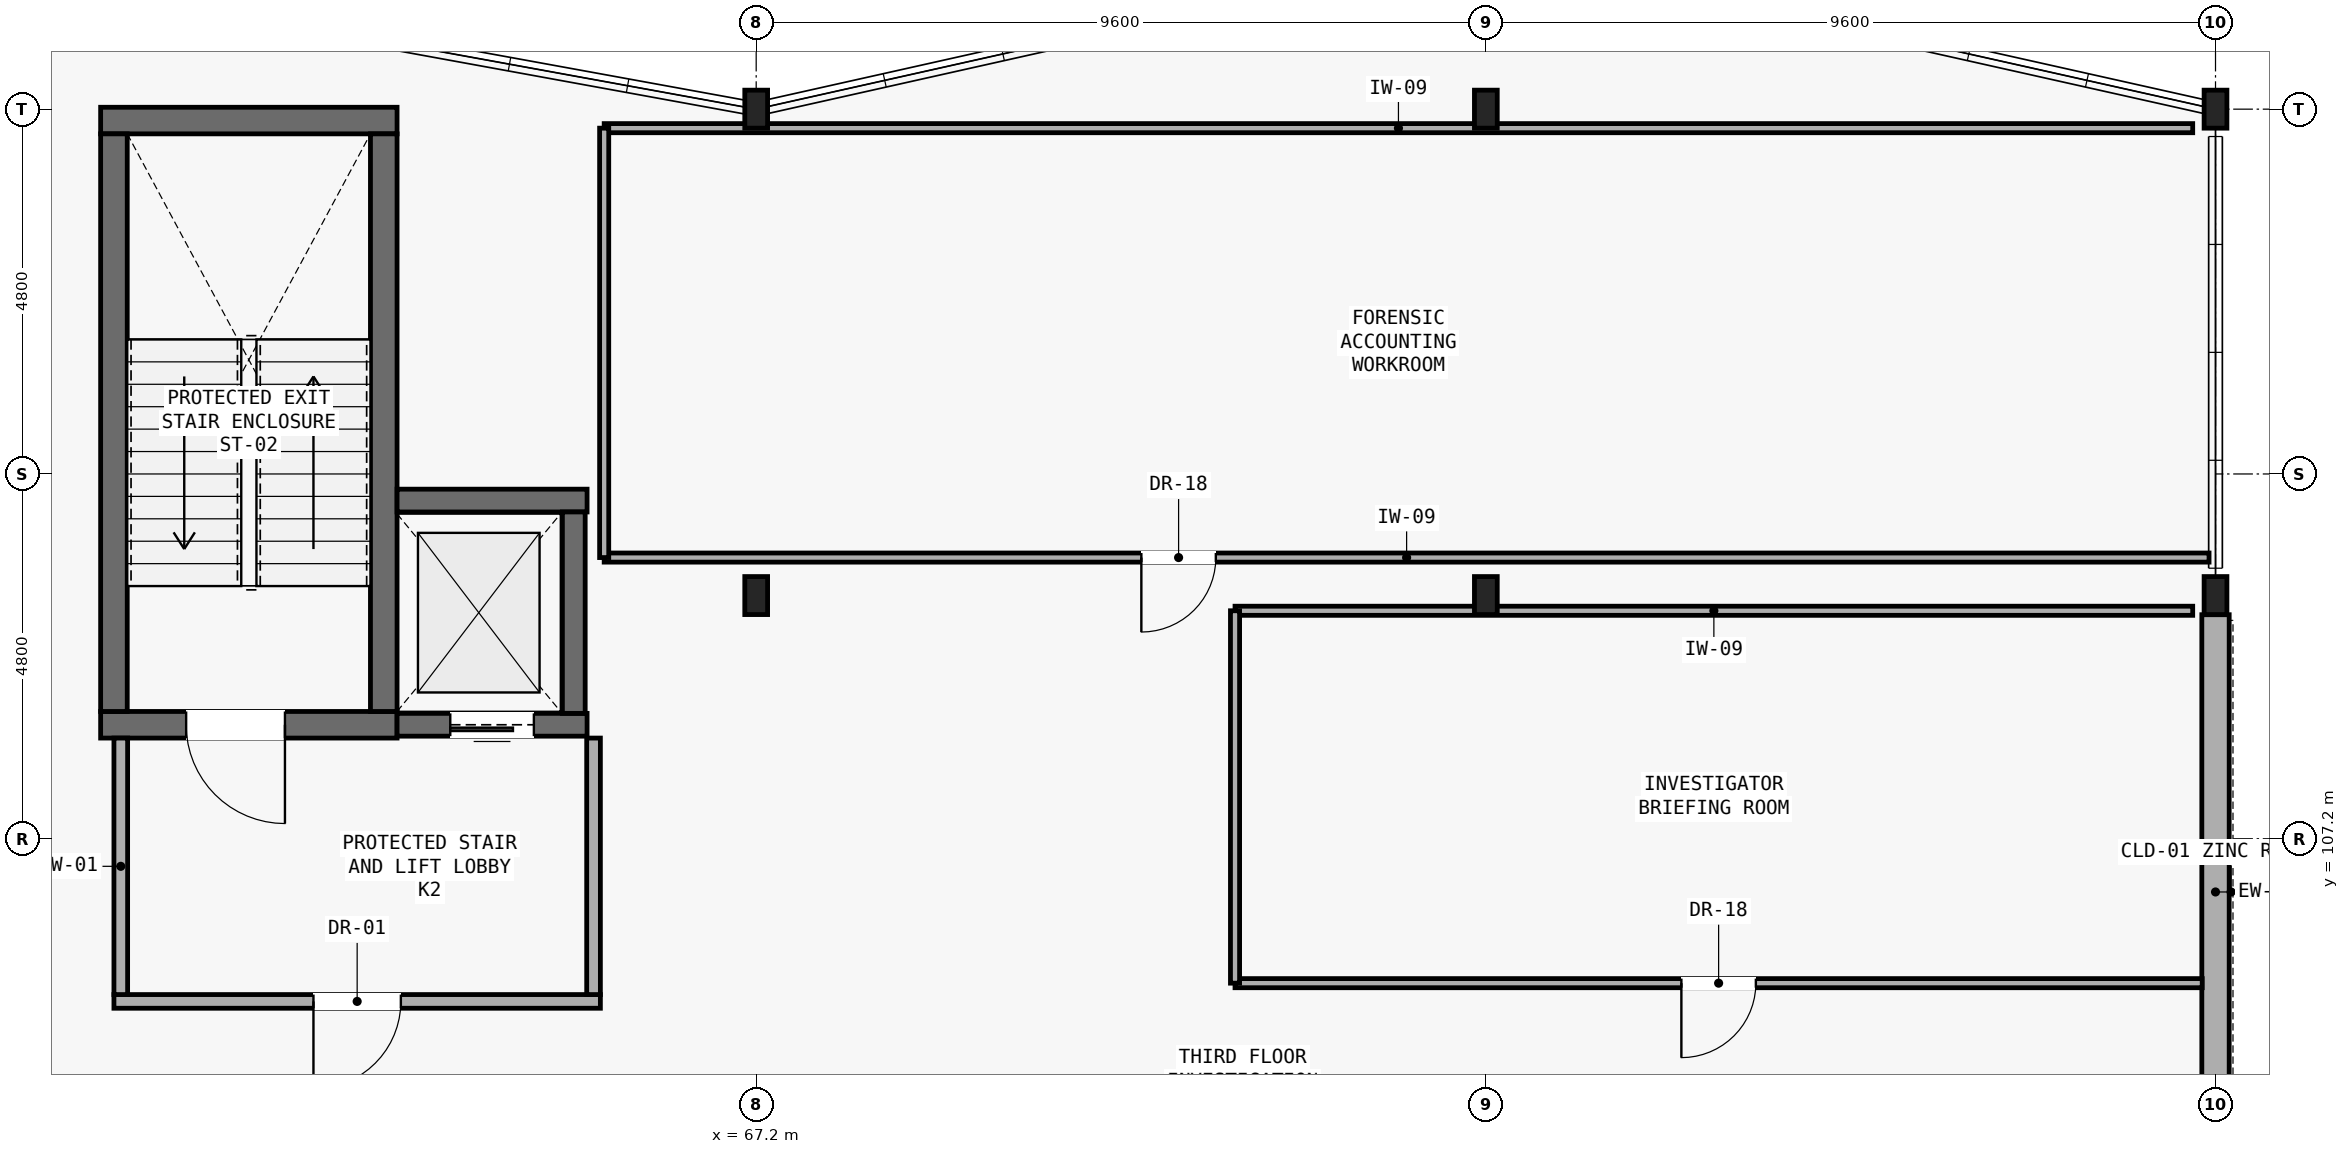
"""IFC4 building model, lengths in metres.
Left out: names, types, materials, properties, quantities, classifications, styles, units other than length and angle.
Written with IfcOpenShell. Run it as: python <this file> out.ifc"""

import sys

from ifc_helpers import new_model, si_unit, direction, frame, frame_2d, origin, origin_2d, place, context, subcontext, project, spatial, rectangle, i_section, extrude, element, fill, save


model = new_model("IFC4")
c1 = context("Model", 3, precision=1e-05, world=origin(), true_north=direction((0.0, 1.0)))
c2 = subcontext(c1, "Body", "Model", "MODEL_VIEW")
j1 = project(units=[si_unit("LENGTHUNIT", "METRE"), si_unit("PLANEANGLEUNIT", "RADIAN")], contexts=[c1])
p1 = place(None, origin())
s1 = spatial("IfcSite", under=j1, at=p1, CompositionType="ELEMENT")
p2 = place(p1, origin())
s2 = spatial("IfcBuilding", under=s1, at=p2, CompositionType="ELEMENT")
p3 = place(p2, frame((0.0, 0.0, 13.65)))
s3 = spatial("IfcBuildingStorey", under=s2, at=p3, CompositionType="ELEMENT", Elevation=13.65)
for number, where, z_axis, x_axis in (
    (1, (67.2, 110.4, 0.0), (0.0, 0.0, 1.0), (1.0, 0.0, 0.0)),
    (2, (67.2, 116.8, 0.0), (0.0, 0.0, 1.0), (1.0, 0.0, 0.0)),
    (3, (76.8, 110.4, 0.0), (0.0, 0.0, 1.0), (1.0, 0.0, 0.0)),
    (4, (76.8, 116.8, 0.0), (0.0, 0.0, 1.0), (1.0, 0.0, 0.0)),
    (5, (86.4, 110.4, 0.0), (0.0, 0.0, 1.0), (1.0, 0.0, 0.0)),
    (6, (86.4, 116.8, 0.0), (0.0, 0.0, 1.0), (1.0, 0.0, 0.0)),
):
    element("IfcColumn", number, at=place(p3, frame(where, z_axis=z_axis, x_axis=x_axis)), inside=s3, PredefinedType="COLUMN", context=c2, shape_type="SweptSolid", body=[
        extrude(i_section(OverallWidth=0.3, OverallDepth=0.5, WebThickness=0.014, FlangeThickness=0.028, FilletRadius=0.027, at=origin_2d()), origin(), (0.0, 0.0, 1.0), 4.2),
    ])
p4 = place(p3, frame((86.4, 102.852, 0.0), z_axis=(0.0, 0.0, 1.0), x_axis=(0.0, 1.0, 0.0)))
e7 = element("IfcWall", 7, at=p4, inside=s3, PredefinedType="SOLIDWALL", context=c2, shape_type="SweptSolid", body=[
    extrude(rectangle(XDim=7.296, YDim=0.36, at=frame_2d((3.648, 0.0))), origin(), (0.0, 0.0, 1.0), 3.52),
])
p5 = place(p3, frame((58.575, 108.7, 0.0), z_axis=(0.0, 0.0, 1.0), x_axis=(1.0, 0.0, 0.0)))
e8 = element("IfcWall", 8, at=p5, inside=s3, PredefinedType="SHEAR", context=c2, shape_type="SweptSolid", body=[
    extrude(rectangle(XDim=3.9, YDim=0.35, at=frame_2d((1.95, 0.0))), origin(), (0.0, 0.0, 1.0), 3.98),
])
p6 = place(p5, frame((1.125, 0.0, 0.0)))
e9 = element("IfcOpeningElement", 9, at=p6, cuts=e8, PredefinedType="OPENING", context=c2, shape_type="SweptSolid", body=[
    extrude(rectangle(XDim=1.3, YDim=2.15, at=frame_2d((0.65, 1.075))), frame((0.0, 0.185, 0.0), z_axis=(0.0, -1.0, 0.0), x_axis=(1.0, 0.0, 0.0)), (0.0, 0.0, 1.0), 0.37),
])
p7 = place(p3, frame((58.575, 116.65, 0.0), z_axis=(0.0, 0.0, 1.0), x_axis=(1.0, 0.0, 0.0)))
e10 = element("IfcWall", 10, at=p7, inside=s3, PredefinedType="SHEAR", context=c2, shape_type="SweptSolid", body=[
    extrude(rectangle(XDim=3.9, YDim=0.35, at=frame_2d((1.95, 0.0))), origin(), (0.0, 0.0, 1.0), 3.98),
])
for number, where, z_axis, x_axis in (
    (11, (58.75, 108.875, 0.0), (0.0, 0.0, 1.0), (0.0, 1.0, 0.0)),
    (12, (62.3, 108.875, 0.0), (0.0, 0.0, 1.0), (0.0, 1.0, 0.0)),
):
    element("IfcWall", number, at=place(p3, frame(where, z_axis=z_axis, x_axis=x_axis)), inside=s3, PredefinedType="SHEAR", context=c2, shape_type="SweptSolid", body=[
        extrude(rectangle(XDim=7.6, YDim=0.35, at=frame_2d((3.8, 0.0))), origin(), (0.0, 0.0, 1.0), 3.98),
    ])
p8 = place(p3, frame((62.475, 108.7, 0.0), z_axis=(0.0, 0.0, 1.0), x_axis=(1.0, 0.0, 0.0)))
e13 = element("IfcWall", 13, at=p8, inside=s3, PredefinedType="SHEAR", context=c2, shape_type="SweptSolid", body=[
    extrude(rectangle(XDim=2.5, YDim=0.3, at=frame_2d((1.25, 0.0))), origin(), (0.0, 0.0, 1.0), 3.98),
])
p9 = place(p8, frame((0.7, 0.0, 0.0)))
e14 = element("IfcOpeningElement", 14, at=p9, cuts=e13, PredefinedType="OPENING", context=c2, shape_type="SweptSolid", body=[
    extrude(rectangle(XDim=1.1, YDim=2.1, at=frame_2d((0.55, 1.05))), frame((0.0, 0.16, 0.0), z_axis=(0.0, -1.0, 0.0), x_axis=(1.0, 0.0, 0.0)), (0.0, 0.0, 1.0), 0.32),
])
p10 = place(p3, frame((62.475, 111.65, 0.0), z_axis=(0.0, 0.0, 1.0), x_axis=(1.0, 0.0, 0.0)))
e15 = element("IfcWall", 15, at=p10, inside=s3, PredefinedType="SHEAR", context=c2, shape_type="SweptSolid", body=[
    extrude(rectangle(XDim=2.5, YDim=0.3, at=frame_2d((1.25, 0.0))), origin(), (0.0, 0.0, 1.0), 3.98),
])
p11 = place(p3, frame((64.8, 108.85, 0.0), z_axis=(0.0, 0.0, 1.0), x_axis=(0.0, 1.0, 0.0)))
e16 = element("IfcWall", 16, at=p11, inside=s3, PredefinedType="SHEAR", context=c2, shape_type="SweptSolid", body=[
    extrude(rectangle(XDim=2.65, YDim=0.3, at=frame_2d((1.325, 0.0))), origin(), (0.0, 0.0, 1.0), 3.98),
])
p12 = place(p3, frame((58.75, 105.06, 0.0), z_axis=(0.0, 0.0, 1.0), x_axis=(1.0, 0.0, 0.0)))
e17 = element("IfcWall", 17, at=p12, inside=s3, PredefinedType="PARTITIONING", context=c2, shape_type="SweptSolid", body=[
    extrude(rectangle(XDim=6.4, YDim=0.18, at=frame_2d((3.2, 0.0))), origin(), (0.0, 0.0, 1.0), 3.6),
])
p13 = place(p12, frame((2.625, 0.0, 0.0)))
e18 = element("IfcOpeningElement", 18, at=p13, cuts=e17, PredefinedType="OPENING", context=c2, shape_type="SweptSolid", body=[
    extrude(rectangle(XDim=1.15, YDim=2.15, at=frame_2d((0.575, 1.075))), frame((0.0, 0.1, 0.0), z_axis=(0.0, -1.0, 0.0), x_axis=(1.0, 0.0, 0.0)), (0.0, 0.0, 1.0), 0.2),
])
for number, where, z_axis, x_axis in (
    (19, (58.84, 105.15, 0.0), (0.0, 0.0, 1.0), (0.0, 1.0, 0.0)),
    (20, (65.06, 105.15, 0.0), (0.0, 0.0, 1.0), (0.0, 1.0, 0.0)),
):
    element("IfcWall", number, at=place(p3, frame(where, z_axis=z_axis, x_axis=x_axis)), inside=s3, PredefinedType="PARTITIONING", context=c2, shape_type="SweptSolid", body=[
        extrude(rectangle(XDim=3.375, YDim=0.18, at=frame_2d((1.688, 0.0))), origin(), (0.0, 0.0, 1.0), 3.98),
    ])
p14 = place(p3, frame((65.2, 110.9, 0.0), z_axis=(0.0, 0.0, 1.0), x_axis=(1.0, 0.0, 0.0)))
e21 = element("IfcWall", 21, at=p14, inside=s3, PredefinedType="PARTITIONING", context=c2, shape_type="SweptSolid", body=[
    extrude(rectangle(XDim=21.115, YDim=0.12, at=frame_2d((10.558, 0.0))), origin(), (0.0, 0.0, 1.0), 3.98),
])
p15 = place(p14, frame((7.067, 0.0, 0.0)))
e22 = element("IfcOpeningElement", 22, at=p15, cuts=e21, PredefinedType="OPENING", context=c2, shape_type="SweptSolid", body=[
    extrude(rectangle(XDim=0.98, YDim=2.1, at=frame_2d((0.49, 1.05))), frame((0.0, 0.07, 0.0), z_axis=(0.0, -1.0, 0.0), x_axis=(1.0, 0.0, 0.0)), (0.0, 0.0, 1.0), 0.14),
])
p16 = place(p3, frame((86.1, 116.55, 0.0), z_axis=(0.0, 0.0, 1.0), x_axis=(-1.0, 0.0, 0.0)))
e23 = element("IfcWall", 23, at=p16, inside=s3, PredefinedType="PARTITIONING", context=c2, shape_type="SweptSolid", body=[
    extrude(rectangle(XDim=20.9, YDim=0.12, at=frame_2d((10.45, 0.0))), origin(), (0.0, 0.0, 1.0), 3.65),
])
p17 = place(p3, frame((65.2, 116.55, 0.0), z_axis=(0.0, 0.0, 1.0), x_axis=(0.0, -1.0, 0.0)))
e24 = element("IfcWall", 24, at=p17, inside=s3, PredefinedType="PARTITIONING", context=c2, shape_type="SweptSolid", body=[
    extrude(rectangle(XDim=5.65, YDim=0.12, at=frame_2d((2.825, 0.0))), origin(), (0.0, 0.0, 1.0), 3.98),
])
p18 = place(p3, frame((73.5, 105.3, 0.0), z_axis=(0.0, 0.0, 1.0), x_axis=(1.0, 0.0, 0.0)))
e25 = element("IfcWall", 25, at=p18, inside=s3, PredefinedType="PARTITIONING", context=c2, shape_type="SweptSolid", body=[
    extrude(rectangle(XDim=12.725, YDim=0.12, at=frame_2d((6.363, 0.0))), origin(), (0.0, 0.0, 1.0), 3.6),
])
p19 = place(p18, frame((5.873, 0.0, 0.0)))
e26 = element("IfcOpeningElement", 26, at=p19, cuts=e25, PredefinedType="OPENING", context=c2, shape_type="SweptSolid", body=[
    extrude(rectangle(XDim=0.98, YDim=2.1, at=frame_2d((0.49, 1.05))), frame((0.0, 0.07, 0.0), z_axis=(0.0, -1.0, 0.0), x_axis=(1.0, 0.0, 0.0)), (0.0, 0.0, 1.0), 0.14),
])
p20 = place(p3, frame((86.1, 110.2, 0.0), z_axis=(0.0, 0.0, 1.0), x_axis=(-1.0, 0.0, 0.0)))
e27 = element("IfcWall", 27, at=p20, inside=s3, PredefinedType="PARTITIONING", context=c2, shape_type="SweptSolid", body=[
    extrude(rectangle(XDim=12.6, YDim=0.12, at=frame_2d((6.3, 0.0))), origin(), (0.0, 0.0, 1.0), 3.42),
])
p21 = place(p3, frame((73.5, 110.2, 0.0), z_axis=(0.0, 0.0, 1.0), x_axis=(0.0, -1.0, 0.0)))
e28 = element("IfcWall", 28, at=p21, inside=s3, PredefinedType="PARTITIONING", context=c2, shape_type="SweptSolid", body=[
    extrude(rectangle(XDim=4.9, YDim=0.12, at=frame_2d((2.45, 0.0))), origin(), (0.0, 0.0, 1.0), 3.98),
])
p22 = place(p6, frame((1.3, 0.0, 0.0), z_axis=(0.0, 0.0, 1.0), x_axis=(-1.0, 0.0, 0.0)))
e29 = element("IfcDoor", 29, at=p22, inside=s3, OperationType="SINGLE_SWING_RIGHT", PredefinedType="DOOR", context=c2, shape_type="SweptSolid", body=[
    extrude(rectangle(XDim=1.3, YDim=2.15, at=frame_2d((0.65, 1.075))), frame((0.0, 0.025, 0.0), z_axis=(0.0, -1.0, 0.0), x_axis=(1.0, 0.0, 0.0)), (0.0, 0.0, 1.0), 0.05),
])
fill(e9, e29)
p23 = place(p9, frame((1.1, 0.0, 0.0), z_axis=(0.0, 0.0, 1.0), x_axis=(-1.0, 0.0, 0.0)))
e30 = element("IfcDoor", 30, at=p23, inside=s3, OperationType="SLIDING_TO_LEFT", PredefinedType="DOOR", context=c2, shape_type="SweptSolid", body=[
    extrude(rectangle(XDim=1.1, YDim=2.1, at=frame_2d((0.55, 1.05))), frame((0.0, 0.025, 0.0), z_axis=(0.0, -1.0, 0.0), x_axis=(1.0, 0.0, 0.0)), (0.0, 0.0, 1.0), 0.05),
])
fill(e14, e30)
p24 = place(p13, frame((1.15, 0.0, 0.0), z_axis=(0.0, 0.0, 1.0), x_axis=(-1.0, 0.0, 0.0)))
e31 = element("IfcDoor", 31, at=p24, inside=s3, OperationType="SINGLE_SWING_LEFT", PredefinedType="DOOR", context=c2, shape_type="SweptSolid", body=[
    extrude(rectangle(XDim=1.15, YDim=2.15, at=frame_2d((0.575, 1.075))), frame((0.0, 0.025, 0.0), z_axis=(0.0, -1.0, 0.0), x_axis=(1.0, 0.0, 0.0)), (0.0, 0.0, 1.0), 0.05),
])
fill(e18, e31)
p25 = place(p15, frame((0.98, 0.0, 0.0), z_axis=(0.0, 0.0, 1.0), x_axis=(-1.0, 0.0, 0.0)))
e32 = element("IfcDoor", 32, at=p25, inside=s3, OperationType="SINGLE_SWING_LEFT", PredefinedType="DOOR", context=c2, shape_type="SweptSolid", body=[
    extrude(rectangle(XDim=0.98, YDim=2.1, at=frame_2d((0.49, 1.05))), frame((0.0, 0.025, 0.0), z_axis=(0.0, -1.0, 0.0), x_axis=(1.0, 0.0, 0.0)), (0.0, 0.0, 1.0), 0.05),
])
fill(e22, e32)
p26 = place(p19, frame((0.98, 0.0, 0.0), z_axis=(0.0, 0.0, 1.0), x_axis=(-1.0, 0.0, 0.0)))
e33 = element("IfcDoor", 33, at=p26, inside=s3, OperationType="SINGLE_SWING_LEFT", PredefinedType="DOOR", context=c2, shape_type="SweptSolid", body=[
    extrude(rectangle(XDim=0.98, YDim=2.1, at=frame_2d((0.49, 1.05))), frame((0.0, 0.025, 0.0), z_axis=(0.0, -1.0, 0.0), x_axis=(1.0, 0.0, 0.0)), (0.0, 0.0, 1.0), 0.05),
])
fill(e26, e33)
save(model, sys.argv[1])
